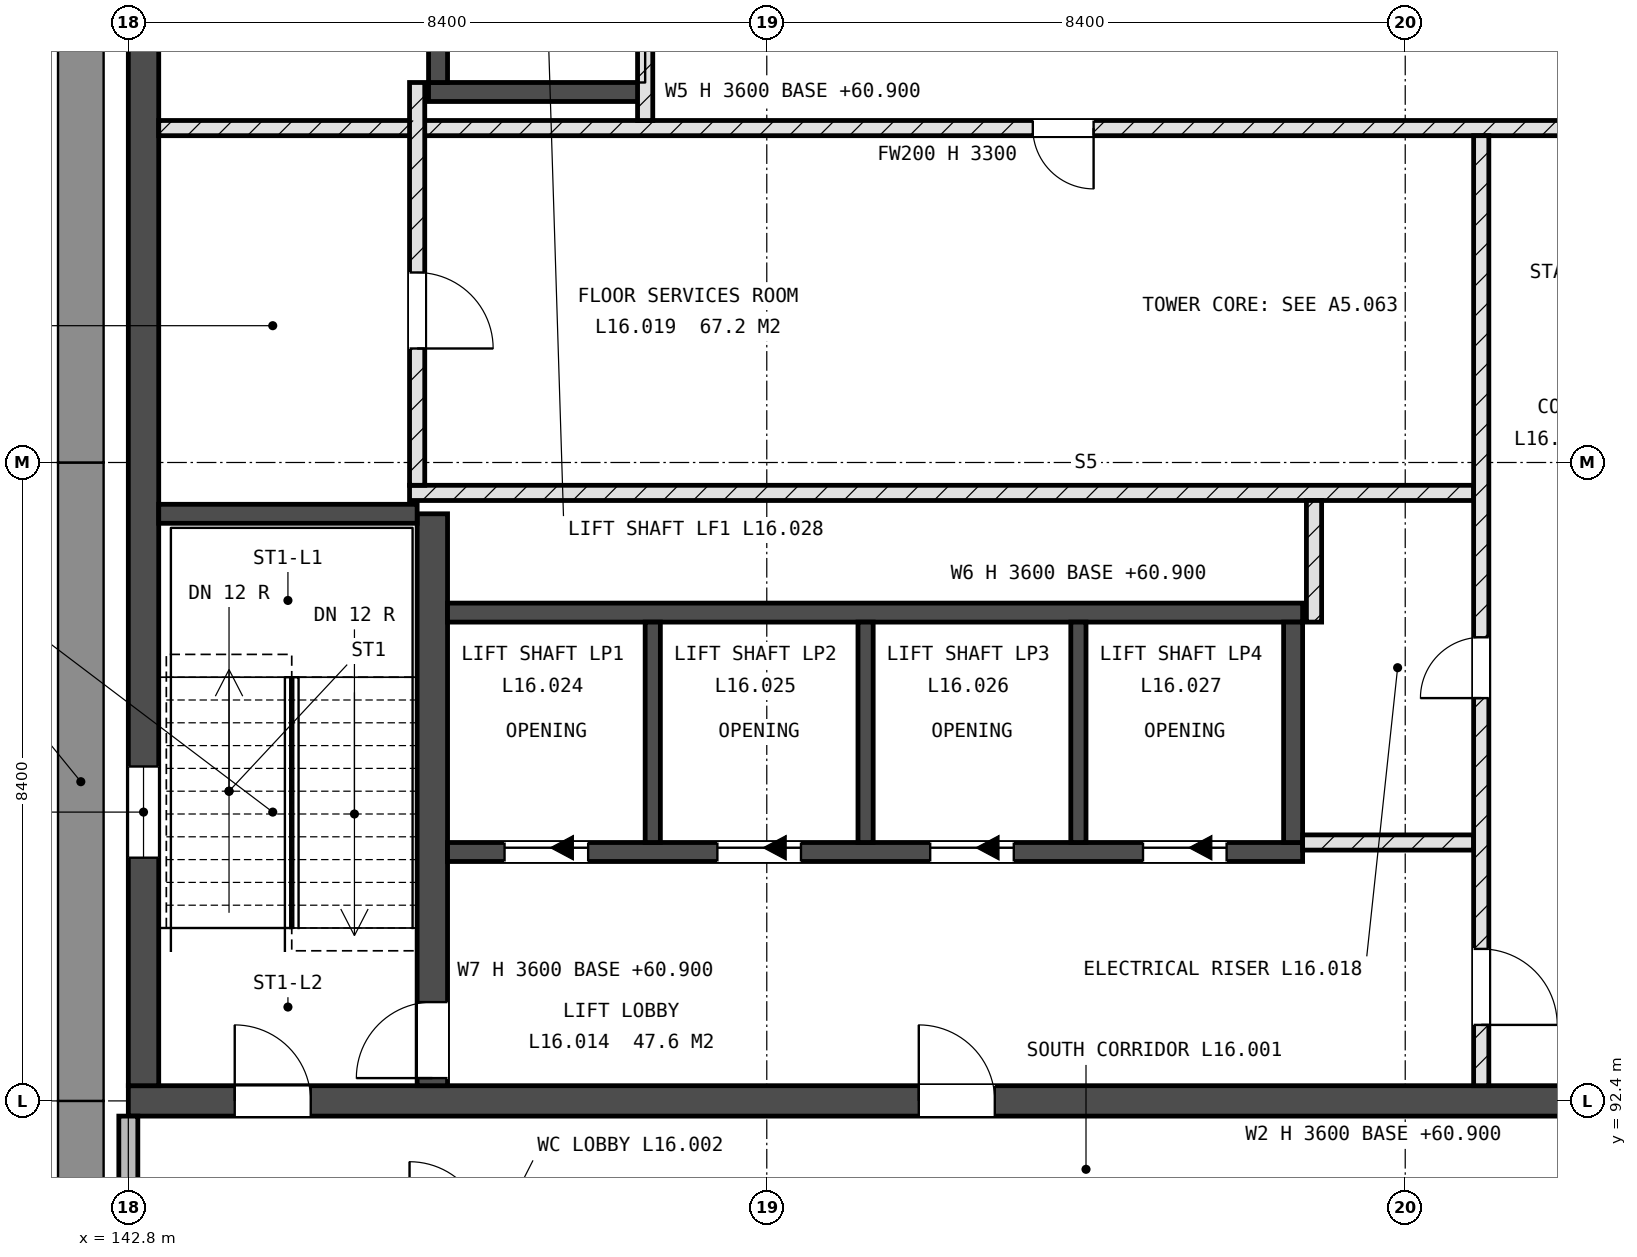
"""IFC4 building model, lengths in metres.
Left out: names, types, materials, properties, quantities, classifications, styles, units other than length and angle.
Written with IfcOpenShell. Run it as: python <this file> out.ifc"""

import sys

from ifc_helpers import new_model, si_unit, direction, frame, frame_2d, origin, place, context, subcontext, project, spatial, rectangle, extrude, element, fill, save


model = new_model("IFC4")
c1 = context("Model", 3, precision=1e-05, world=origin(), true_north=direction((0.0, 1.0)))
c2 = subcontext(c1, "Body", "Model", "MODEL_VIEW")
j1 = project(units=[si_unit("LENGTHUNIT", "METRE"), si_unit("PLANEANGLEUNIT", "RADIAN")], contexts=[c1])
p1 = place(None, origin())
s1 = spatial("IfcSite", under=j1, at=p1, CompositionType="ELEMENT")
p2 = place(p1, origin())
s2 = spatial("IfcBuilding", under=s1, at=p2, CompositionType="ELEMENT")
p3 = place(p2, frame((0.0, 0.0, 61.2)))
s3 = spatial("IfcBuildingStorey", under=s2, at=p3, CompositionType="ELEMENT", Elevation=61.2)
p4 = place(p3, frame((142.8, 92.4, -0.3), z_axis=(0.0, 0.0, 1.0), x_axis=(1.0, 0.0, 0.0)))
e1 = element("IfcWall", 1, at=p4, inside=s3, PredefinedType="SHEAR", context=c2, shape_type="SweptSolid", body=[
    extrude(rectangle(XDim=25.2, YDim=0.4, at=frame_2d((12.6, 0.0))), origin(), (0.0, 0.0, 1.0), 3.6),
])
p5 = place(p4, frame((1.4, 0.0, 0.3)))
e2 = element("IfcOpeningElement", 2, at=p5, cuts=e1, PredefinedType="OPENING", context=c2, shape_type="SweptSolid", body=[
    extrude(rectangle(XDim=1.0, YDim=2.1, at=frame_2d((0.5, 1.05))), frame((0.0, 0.21, 0.0), z_axis=(0.0, -1.0, 0.0), x_axis=(1.0, 0.0, 0.0)), (0.0, 0.0, 1.0), 0.42),
])
p6 = place(p4, frame((19.1, 0.0, 0.3)))
e3 = element("IfcOpeningElement", 3, at=p6, cuts=e1, PredefinedType="OPENING", context=c2, shape_type="SweptSolid", body=[
    extrude(rectangle(XDim=1.0, YDim=2.1, at=frame_2d((0.5, 1.05))), frame((0.0, 0.21, 0.0), z_axis=(0.0, -1.0, 0.0), x_axis=(1.0, 0.0, 0.0)), (0.0, 0.0, 1.0), 0.42),
])
p7 = place(p4, frame((10.4, 0.0, 0.3)))
e4 = element("IfcOpeningElement", 4, at=p7, cuts=e1, PredefinedType="OPENING", context=c2, shape_type="SweptSolid", body=[
    extrude(rectangle(XDim=1.0, YDim=2.1, at=frame_2d((0.5, 1.05))), frame((0.0, 0.21, 0.0), z_axis=(0.0, -1.0, 0.0), x_axis=(1.0, 0.0, 0.0)), (0.0, 0.0, 1.0), 0.42),
])
p8 = place(p3, frame((143.0, 92.6, -0.3), z_axis=(0.0, 0.0, 1.0), x_axis=(0.0, 1.0, 0.0)))
e5 = element("IfcWall", 5, at=p8, inside=s3, PredefinedType="SHEAR", context=c2, shape_type="SweptSolid", body=[
    extrude(rectangle(XDim=16.4, YDim=0.4, at=frame_2d((8.2, 0.0))), origin(), (0.0, 0.0, 1.0), 3.6),
])
p9 = place(p8, frame((3.0, 0.0, 1.9)))
e6 = element("IfcOpeningElement", 6, at=p9, cuts=e5, PredefinedType="OPENING", context=c2, shape_type="SweptSolid", body=[
    extrude(rectangle(XDim=1.2, YDim=0.9, at=frame_2d((0.6, 0.45))), frame((0.0, 0.21, 0.0), z_axis=(0.0, -1.0, 0.0), x_axis=(1.0, 0.0, 0.0)), (0.0, 0.0, 1.0), 0.42),
])
p10 = place(p3, frame((146.8, 92.6, -0.3), z_axis=(0.0, 0.0, 1.0), x_axis=(0.0, 1.0, 0.0)))
e7 = element("IfcWall", 7, at=p10, inside=s3, PredefinedType="SHEAR", context=c2, shape_type="SweptSolid", body=[
    extrude(rectangle(XDim=7.525, YDim=0.4, at=frame_2d((3.762, 0.0))), origin(), (0.0, 0.0, 1.0), 3.6),
])
p11 = place(p10, frame((0.1, 0.0, 0.3)))
e8 = element("IfcOpeningElement", 8, at=p11, cuts=e7, PredefinedType="OPENING", context=c2, shape_type="SweptSolid", body=[
    extrude(rectangle(XDim=1.0, YDim=2.1, at=frame_2d((0.5, 1.05))), frame((0.0, 0.21, 0.0), z_axis=(0.0, -1.0, 0.0), x_axis=(1.0, 0.0, 0.0)), (0.0, 0.0, 1.0), 0.42),
])
p12 = place(p3, frame((143.2, 100.125, -0.3), z_axis=(0.0, 0.0, 1.0), x_axis=(1.0, 0.0, 0.0)))
e9 = element("IfcWall", 9, at=p12, inside=s3, PredefinedType="SHEAR", context=c2, shape_type="SweptSolid", body=[
    extrude(rectangle(XDim=3.4, YDim=0.25, at=frame_2d((1.7, 0.0))), origin(), (0.0, 0.0, 1.0), 3.6),
])
p13 = place(p3, frame((147.0, 95.675, -0.3), z_axis=(0.0, 0.0, 1.0), x_axis=(1.0, 0.0, 0.0)))
e10 = element("IfcWall", 10, at=p13, inside=s3, PredefinedType="SHEAR", context=c2, shape_type="SweptSolid", body=[
    extrude(rectangle(XDim=11.25, YDim=0.25, at=frame_2d((5.625, 0.0))), origin(), (0.0, 0.0, 1.0), 3.6),
])
p14 = place(p13, frame((0.75, 0.0, 0.3)))
e11 = element("IfcOpeningElement", 11, at=p14, cuts=e10, PredefinedType="OPENING", context=c2, shape_type="SweptSolid", body=[
    extrude(rectangle(XDim=1.1, YDim=2.1, at=frame_2d((0.55, 1.05))), frame((0.0, 0.135, 0.0), z_axis=(0.0, -1.0, 0.0), x_axis=(1.0, 0.0, 0.0)), (0.0, 0.0, 1.0), 0.27),
])
p15 = place(p13, frame((3.55, 0.0, 0.3)))
e12 = element("IfcOpeningElement", 12, at=p15, cuts=e10, PredefinedType="OPENING", context=c2, shape_type="SweptSolid", body=[
    extrude(rectangle(XDim=1.1, YDim=2.1, at=frame_2d((0.55, 1.05))), frame((0.0, 0.135, 0.0), z_axis=(0.0, -1.0, 0.0), x_axis=(1.0, 0.0, 0.0)), (0.0, 0.0, 1.0), 0.27),
])
p16 = place(p13, frame((6.35, 0.0, 0.3)))
e13 = element("IfcOpeningElement", 13, at=p16, cuts=e10, PredefinedType="OPENING", context=c2, shape_type="SweptSolid", body=[
    extrude(rectangle(XDim=1.1, YDim=2.1, at=frame_2d((0.55, 1.05))), frame((0.0, 0.135, 0.0), z_axis=(0.0, -1.0, 0.0), x_axis=(1.0, 0.0, 0.0)), (0.0, 0.0, 1.0), 0.27),
])
p17 = place(p13, frame((9.15, 0.0, 0.3)))
e14 = element("IfcOpeningElement", 14, at=p17, cuts=e10, PredefinedType="OPENING", context=c2, shape_type="SweptSolid", body=[
    extrude(rectangle(XDim=1.1, YDim=2.1, at=frame_2d((0.55, 1.05))), frame((0.0, 0.135, 0.0), z_axis=(0.0, -1.0, 0.0), x_axis=(1.0, 0.0, 0.0)), (0.0, 0.0, 1.0), 0.27),
])
p18 = place(p3, frame((147.0, 98.825, -0.3), z_axis=(0.0, 0.0, 1.0), x_axis=(1.0, 0.0, 0.0)))
e15 = element("IfcWall", 15, at=p18, inside=s3, PredefinedType="SHEAR", context=c2, shape_type="SweptSolid", body=[
    extrude(rectangle(XDim=11.25, YDim=0.25, at=frame_2d((5.625, 0.0))), origin(), (0.0, 0.0, 1.0), 3.6),
])
p19 = place(p3, frame((158.125, 95.8, -0.3), z_axis=(0.0, 0.0, 1.0), x_axis=(0.0, 1.0, 0.0)))
e16 = element("IfcWall", 16, at=p19, inside=s3, PredefinedType="SHEAR", context=c2, shape_type="SweptSolid", body=[
    extrude(rectangle(XDim=2.9, YDim=0.25, at=frame_2d((1.45, 0.0))), origin(), (0.0, 0.0, 1.0), 3.6),
])
for number, where, z_axis, x_axis in (
    (17, (149.7, 95.8, -0.3), (0.0, 0.0, 1.0), (0.0, 1.0, 0.0)),
    (18, (152.5, 95.8, -0.3), (0.0, 0.0, 1.0), (0.0, 1.0, 0.0)),
    (19, (155.3, 95.8, -0.3), (0.0, 0.0, 1.0), (0.0, 1.0, 0.0)),
):
    element("IfcWall", number, at=place(p3, frame(where, z_axis=z_axis, x_axis=x_axis)), inside=s3, PredefinedType="SHEAR", context=c2, shape_type="SweptSolid", body=[
        extrude(rectangle(XDim=2.9, YDim=0.2, at=frame_2d((1.45, 0.0))), origin(), (0.0, 0.0, 1.0), 3.6),
    ])
p20 = place(p3, frame((146.75, 105.675, -0.3), z_axis=(0.0, 0.0, 1.0), x_axis=(1.0, 0.0, 0.0)))
e20 = element("IfcWall", 20, at=p20, inside=s3, PredefinedType="SHEAR", context=c2, shape_type="SweptSolid", body=[
    extrude(rectangle(XDim=2.85, YDim=0.25, at=frame_2d((1.425, 0.0))), origin(), (0.0, 0.0, 1.0), 3.6),
])
p21 = place(p3, frame((146.875, 105.8, -0.3), z_axis=(0.0, 0.0, 1.0), x_axis=(0.0, 1.0, 0.0)))
e21 = element("IfcWall", 21, at=p21, inside=s3, PredefinedType="SHEAR", context=c2, shape_type="SweptSolid", body=[
    extrude(rectangle(XDim=2.9, YDim=0.25, at=frame_2d((1.45, 0.0))), origin(), (0.0, 0.0, 1.0), 3.6),
])
p22 = place(p3, frame((142.8, 84.325, 0.0), z_axis=(0.0, 0.0, 1.0), x_axis=(0.0, 1.0, 0.0)))
e22 = element("IfcWall", 22, at=p22, inside=s3, PredefinedType="STANDARD", context=c2, shape_type="SweptSolid", body=[
    extrude(rectangle(XDim=7.875, YDim=0.25, at=frame_2d((3.938, 0.0))), origin(), (0.0, 0.0, 1.0), 3.3),
])
p23 = place(p22, frame((2.375, 0.0, 2.1)))
e23 = element("IfcOpeningElement", 23, at=p23, cuts=e22, PredefinedType="OPENING", context=c2, shape_type="SweptSolid", body=[
    extrude(rectangle(XDim=0.9, YDim=0.6, at=frame_2d((0.45, 0.3))), frame((0.0, 0.135, 0.0), z_axis=(0.0, -1.0, 0.0), x_axis=(1.0, 0.0, 0.0)), (0.0, 0.0, 1.0), 0.27),
])
p24 = place(p3, frame((158.25, 95.8, 0.0), z_axis=(0.0, 0.0, 1.0), x_axis=(1.0, 0.0, 0.0)))
e24 = element("IfcWall", 24, at=p24, inside=s3, PredefinedType="SOLIDWALL", context=c2, shape_type="SweptSolid", body=[
    extrude(rectangle(XDim=2.25, YDim=0.2, at=frame_2d((1.125, 0.0))), origin(), (0.0, 0.0, 1.0), 3.3),
])
p25 = place(p3, frame((146.5, 100.4, 0.0), z_axis=(0.0, 0.0, 1.0), x_axis=(1.0, 0.0, 0.0)))
e25 = element("IfcWall", 25, at=p25, inside=s3, PredefinedType="SOLIDWALL", context=c2, shape_type="SweptSolid", body=[
    extrude(rectangle(XDim=14.0, YDim=0.2, at=frame_2d((7.0, 0.0))), origin(), (0.0, 0.0, 1.0), 3.3),
])
p26 = place(p3, frame((143.2, 105.2, 0.0), z_axis=(0.0, 0.0, 1.0), x_axis=(1.0, 0.0, 0.0)))
e26 = element("IfcWall", 26, at=p26, inside=s3, PredefinedType="SOLIDWALL", context=c2, shape_type="SweptSolid", body=[
    extrude(rectangle(XDim=20.75, YDim=0.2, at=frame_2d((10.375, 0.0))), origin(), (0.0, 0.0, 1.0), 3.3),
])
p27 = place(p26, frame((11.5, 0.0, 0.0)))
e27 = element("IfcOpeningElement", 27, at=p27, cuts=e26, PredefinedType="OPENING", context=c2, shape_type="SweptSolid", body=[
    extrude(rectangle(XDim=0.8, YDim=2.1, at=frame_2d((0.4, 1.05))), frame((0.0, 0.11, 0.0), z_axis=(0.0, -1.0, 0.0), x_axis=(1.0, 0.0, 0.0)), (0.0, 0.0, 1.0), 0.22),
])
p28 = place(p26, frame((18.8, 0.0, 0.0)))
e28 = element("IfcOpeningElement", 28, at=p28, cuts=e26, PredefinedType="OPENING", context=c2, shape_type="SweptSolid", body=[
    extrude(rectangle(XDim=1.0, YDim=2.1, at=frame_2d((0.5, 1.05))), frame((0.0, 0.11, 0.0), z_axis=(0.0, -1.0, 0.0), x_axis=(1.0, 0.0, 0.0)), (0.0, 0.0, 1.0), 0.22),
])
p29 = place(p3, frame((146.6, 100.5, 0.0), z_axis=(0.0, 0.0, 1.0), x_axis=(0.0, 1.0, 0.0)))
e29 = element("IfcWall", 29, at=p29, inside=s3, PredefinedType="SOLIDWALL", context=c2, shape_type="SweptSolid", body=[
    extrude(rectangle(XDim=5.3, YDim=0.2, at=frame_2d((2.65, 0.0))), origin(), (0.0, 0.0, 1.0), 3.3),
])
p30 = place(p29, frame((1.8, 0.0, 0.0)))
e30 = element("IfcOpeningElement", 30, at=p30, cuts=e29, PredefinedType="OPENING", context=c2, shape_type="SweptSolid", body=[
    extrude(rectangle(XDim=1.0, YDim=2.1, at=frame_2d((0.5, 1.05))), frame((0.0, 0.11, 0.0), z_axis=(0.0, -1.0, 0.0), x_axis=(1.0, 0.0, 0.0)), (0.0, 0.0, 1.0), 0.22),
])
p31 = place(p3, frame((149.6, 105.3, 0.0), z_axis=(0.0, 0.0, 1.0), x_axis=(0.0, 1.0, 0.0)))
e31 = element("IfcWall", 31, at=p31, inside=s3, PredefinedType="SOLIDWALL", context=c2, shape_type="SweptSolid", body=[
    extrude(rectangle(XDim=3.7, YDim=0.2, at=frame_2d((1.85, 0.0))), origin(), (0.0, 0.0, 1.0), 3.3),
])
p32 = place(p31, frame((1.4, 0.0, 0.0)))
e32 = element("IfcOpeningElement", 32, at=p32, cuts=e31, PredefinedType="OPENING", context=c2, shape_type="SweptSolid", body=[
    extrude(rectangle(XDim=1.1, YDim=2.1, at=frame_2d((0.55, 1.05))), frame((0.0, 0.11, 0.0), z_axis=(0.0, -1.0, 0.0), x_axis=(1.0, 0.0, 0.0)), (0.0, 0.0, 1.0), 0.22),
])
p33 = place(p3, frame((158.4, 98.7, 0.0), z_axis=(0.0, 0.0, 1.0), x_axis=(0.0, 1.0, 0.0)))
e33 = element("IfcWall", 33, at=p33, inside=s3, PredefinedType="SOLIDWALL", context=c2, shape_type="SweptSolid", body=[
    extrude(rectangle(XDim=1.6, YDim=0.2, at=frame_2d((0.8, 0.0))), origin(), (0.0, 0.0, 1.0), 3.3),
])
p34 = place(p3, frame((160.6, 92.6, 0.0), z_axis=(0.0, 0.0, 1.0), x_axis=(0.0, 1.0, 0.0)))
e34 = element("IfcWall", 34, at=p34, inside=s3, PredefinedType="SOLIDWALL", context=c2, shape_type="SweptSolid", body=[
    extrude(rectangle(XDim=12.5, YDim=0.2, at=frame_2d((6.25, 0.0))), origin(), (0.0, 0.0, 1.0), 3.3),
])
p35 = place(p34, frame((5.1, 0.0, 0.0)))
e35 = element("IfcOpeningElement", 35, at=p35, cuts=e34, PredefinedType="OPENING", context=c2, shape_type="SweptSolid", body=[
    extrude(rectangle(XDim=0.8, YDim=2.1, at=frame_2d((0.4, 1.05))), frame((0.0, 0.11, 0.0), z_axis=(0.0, -1.0, 0.0), x_axis=(1.0, 0.0, 0.0)), (0.0, 0.0, 1.0), 0.22),
])
p36 = place(p34, frame((0.8, 0.0, 0.0)))
e36 = element("IfcOpeningElement", 36, at=p36, cuts=e34, PredefinedType="OPENING", context=c2, shape_type="SweptSolid", body=[
    extrude(rectangle(XDim=1.0, YDim=2.1, at=frame_2d((0.5, 1.05))), frame((0.0, 0.11, 0.0), z_axis=(0.0, -1.0, 0.0), x_axis=(1.0, 0.0, 0.0)), (0.0, 0.0, 1.0), 0.22),
])
p37 = place(p9, origin())
e37 = element("IfcWindow", 37, at=p37, inside=s3, PartitioningType="SINGLE_PANEL", PredefinedType="WINDOW", context=c2, shape_type="SweptSolid", body=[
    extrude(rectangle(XDim=1.2, YDim=0.9, at=frame_2d((0.6, 0.45))), frame((0.0, 0.03, 0.0), z_axis=(0.0, -1.0, 0.0), x_axis=(1.0, 0.0, 0.0)), (0.0, 0.0, 1.0), 0.06),
])
fill(e6, e37)
p38 = place(p14, origin())
e38 = element("IfcDoor", 38, at=p38, inside=s3, OperationType="SLIDING_TO_LEFT", PredefinedType="DOOR", context=c2, shape_type="SweptSolid", body=[
    extrude(rectangle(XDim=1.1, YDim=2.1, at=frame_2d((0.55, 1.05))), frame((0.0, 0.025, 0.0), z_axis=(0.0, -1.0, 0.0), x_axis=(1.0, 0.0, 0.0)), (0.0, 0.0, 1.0), 0.05),
])
fill(e11, e38)
p39 = place(p15, origin())
e39 = element("IfcDoor", 39, at=p39, inside=s3, OperationType="SLIDING_TO_LEFT", PredefinedType="DOOR", context=c2, shape_type="SweptSolid", body=[
    extrude(rectangle(XDim=1.1, YDim=2.1, at=frame_2d((0.55, 1.05))), frame((0.0, 0.025, 0.0), z_axis=(0.0, -1.0, 0.0), x_axis=(1.0, 0.0, 0.0)), (0.0, 0.0, 1.0), 0.05),
])
fill(e12, e39)
p40 = place(p16, origin())
e40 = element("IfcDoor", 40, at=p40, inside=s3, OperationType="SLIDING_TO_LEFT", PredefinedType="DOOR", context=c2, shape_type="SweptSolid", body=[
    extrude(rectangle(XDim=1.1, YDim=2.1, at=frame_2d((0.55, 1.05))), frame((0.0, 0.025, 0.0), z_axis=(0.0, -1.0, 0.0), x_axis=(1.0, 0.0, 0.0)), (0.0, 0.0, 1.0), 0.05),
])
fill(e13, e40)
p41 = place(p17, origin())
e41 = element("IfcDoor", 41, at=p41, inside=s3, OperationType="SLIDING_TO_LEFT", PredefinedType="DOOR", context=c2, shape_type="SweptSolid", body=[
    extrude(rectangle(XDim=1.1, YDim=2.1, at=frame_2d((0.55, 1.05))), frame((0.0, 0.025, 0.0), z_axis=(0.0, -1.0, 0.0), x_axis=(1.0, 0.0, 0.0)), (0.0, 0.0, 1.0), 0.05),
])
fill(e14, e41)
p42 = place(p5, origin())
e42 = element("IfcDoor", 42, at=p42, inside=s3, OperationType="SINGLE_SWING_RIGHT", PredefinedType="DOOR", context=c2, shape_type="SweptSolid", body=[
    extrude(rectangle(XDim=1.0, YDim=2.1, at=frame_2d((0.5, 1.05))), frame((0.0, 0.025, 0.0), z_axis=(0.0, -1.0, 0.0), x_axis=(1.0, 0.0, 0.0)), (0.0, 0.0, 1.0), 0.05),
])
fill(e2, e42)
p43 = place(p11, origin())
e43 = element("IfcDoor", 43, at=p43, inside=s3, OperationType="SINGLE_SWING_RIGHT", PredefinedType="DOOR", context=c2, shape_type="SweptSolid", body=[
    extrude(rectangle(XDim=1.0, YDim=2.1, at=frame_2d((0.5, 1.05))), frame((0.0, 0.025, 0.0), z_axis=(0.0, -1.0, 0.0), x_axis=(1.0, 0.0, 0.0)), (0.0, 0.0, 1.0), 0.05),
])
fill(e8, e43)
p44 = place(p35, origin())
e44 = element("IfcDoor", 44, at=p44, inside=s3, OperationType="SINGLE_SWING_RIGHT", PredefinedType="DOOR", context=c2, shape_type="SweptSolid", body=[
    extrude(rectangle(XDim=0.8, YDim=2.1, at=frame_2d((0.4, 1.05))), frame((0.0, 0.025, 0.0), z_axis=(0.0, -1.0, 0.0), x_axis=(1.0, 0.0, 0.0)), (0.0, 0.0, 1.0), 0.05),
])
fill(e35, e44)
p45 = place(p27, origin())
e45 = element("IfcDoor", 45, at=p45, inside=s3, OperationType="SINGLE_SWING_RIGHT", PredefinedType="DOOR", context=c2, shape_type="SweptSolid", body=[
    extrude(rectangle(XDim=0.8, YDim=2.1, at=frame_2d((0.4, 1.05))), frame((0.0, 0.025, 0.0), z_axis=(0.0, -1.0, 0.0), x_axis=(1.0, 0.0, 0.0)), (0.0, 0.0, 1.0), 0.05),
])
fill(e27, e45)
p46 = place(p30, origin())
e46 = element("IfcDoor", 46, at=p46, inside=s3, OperationType="SINGLE_SWING_LEFT", PredefinedType="DOOR", context=c2, shape_type="SweptSolid", body=[
    extrude(rectangle(XDim=1.0, YDim=2.1, at=frame_2d((0.5, 1.05))), frame((0.0, 0.025, 0.0), z_axis=(0.0, -1.0, 0.0), x_axis=(1.0, 0.0, 0.0)), (0.0, 0.0, 1.0), 0.05),
])
fill(e30, e46)
p47 = place(p7, origin())
e47 = element("IfcDoor", 47, at=p47, inside=s3, OperationType="SINGLE_SWING_RIGHT", PredefinedType="DOOR", context=c2, shape_type="SweptSolid", body=[
    extrude(rectangle(XDim=1.0, YDim=2.1, at=frame_2d((0.5, 1.05))), frame((0.0, 0.025, 0.0), z_axis=(0.0, -1.0, 0.0), x_axis=(1.0, 0.0, 0.0)), (0.0, 0.0, 1.0), 0.05),
])
fill(e4, e47)
p48 = place(p36, origin())
e48 = element("IfcDoor", 48, at=p48, inside=s3, OperationType="SINGLE_SWING_LEFT", PredefinedType="DOOR", context=c2, shape_type="SweptSolid", body=[
    extrude(rectangle(XDim=1.0, YDim=2.1, at=frame_2d((0.5, 1.05))), frame((0.0, 0.025, 0.0), z_axis=(0.0, -1.0, 0.0), x_axis=(1.0, 0.0, 0.0)), (0.0, 0.0, 1.0), 0.05),
])
fill(e36, e48)
save(model, sys.argv[1])
